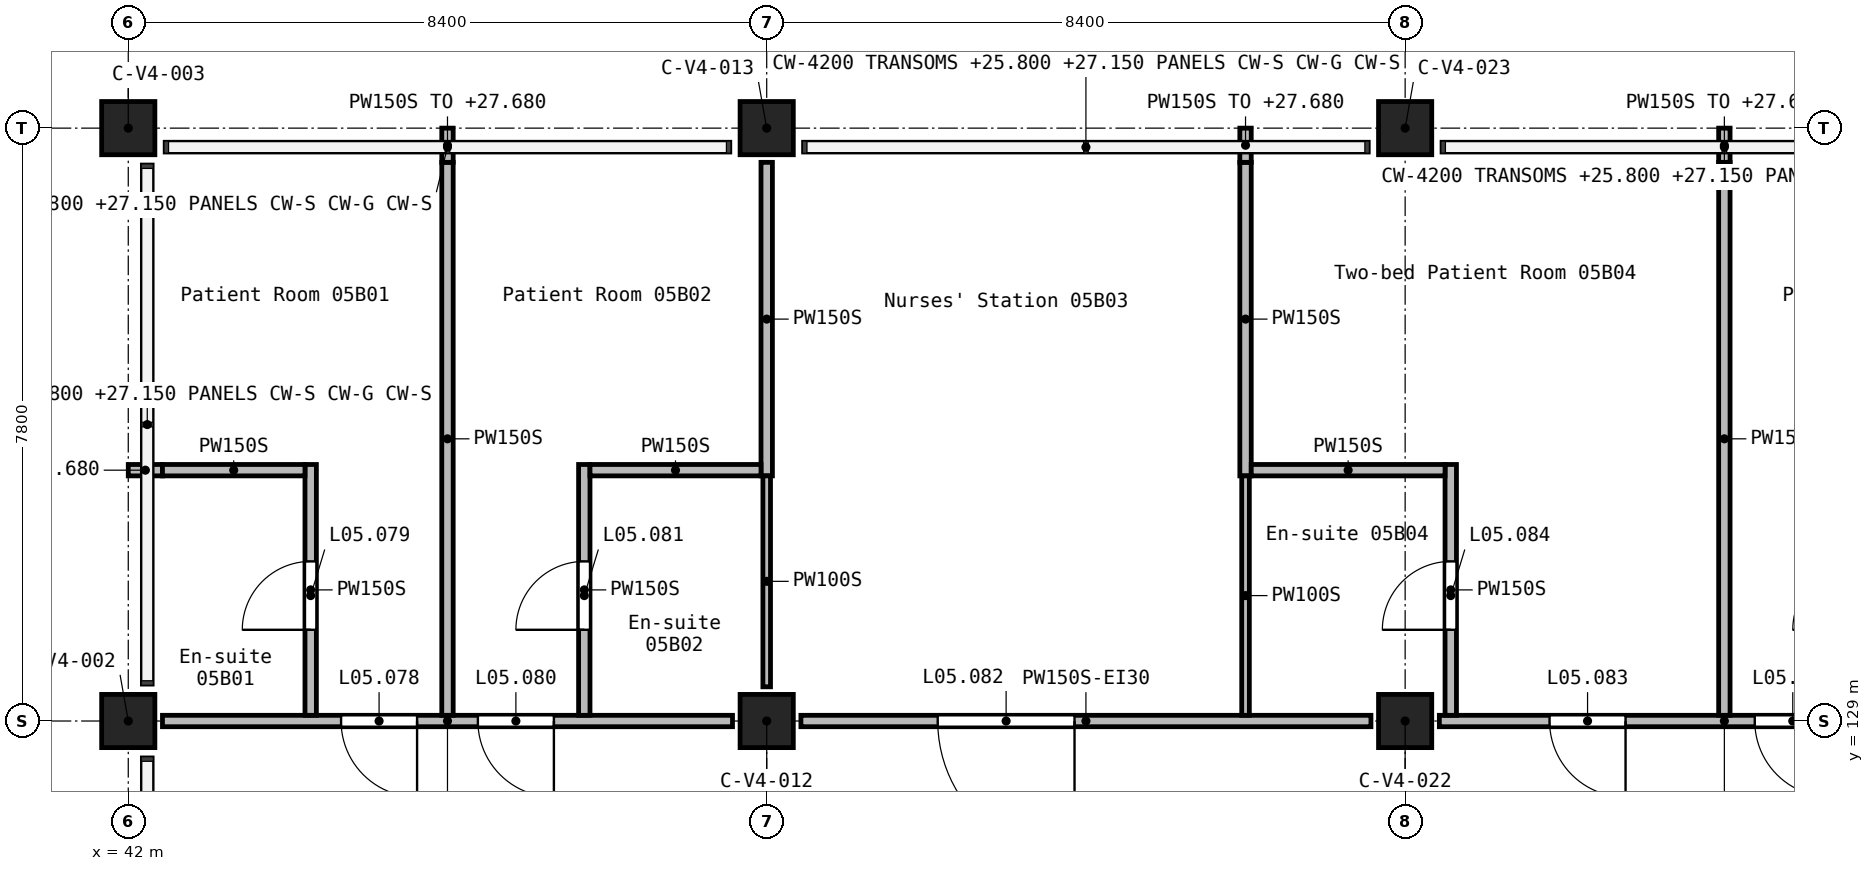
"""IFC4 building model, lengths in metres.
Left out: names, types, materials, properties, quantities, classifications, styles, units other than length and angle.
Written with IfcOpenShell. Run it as: python <this file> out.ifc"""

import sys

from ifc_helpers import new_model, si_unit, direction, frame, frame_2d, origin, origin_2d, place, context, subcontext, project, spatial, rectangle, extrude, element, fill, save


model = new_model("IFC4")
c1 = context("Model", 3, precision=1e-05, world=origin(), true_north=direction((0.0, 1.0)))
c2 = subcontext(c1, "Body", "Model", "MODEL_VIEW")
j1 = project(units=[si_unit("LENGTHUNIT", "METRE"), si_unit("PLANEANGLEUNIT", "RADIAN")], contexts=[c1])
p1 = place(None, origin())
s1 = spatial("IfcSite", under=j1, at=p1, CompositionType="ELEMENT")
p2 = place(p1, origin())
s2 = spatial("IfcBuilding", under=s1, at=p2, CompositionType="ELEMENT")
p3 = place(p2, frame((0.0, 0.0, 24.9)))
s3 = spatial("IfcBuildingStorey", under=s2, at=p3, CompositionType="ELEMENT", Elevation=24.9)
for number, where, z_axis, x_axis in (
    (1, (42.0, 129.0, 0.0), (0.0, 0.0, 1.0), (1.0, 0.0, 0.0)),
    (2, (42.0, 136.8, 0.0), (0.0, 0.0, 1.0), (1.0, 0.0, 0.0)),
    (3, (50.4, 129.0, 0.0), (0.0, 0.0, 1.0), (1.0, 0.0, 0.0)),
    (4, (50.4, 136.8, 0.0), (0.0, 0.0, 1.0), (1.0, 0.0, 0.0)),
    (5, (58.8, 129.0, 0.0), (0.0, 0.0, 1.0), (1.0, 0.0, 0.0)),
    (6, (58.8, 136.8, 0.0), (0.0, 0.0, 1.0), (1.0, 0.0, 0.0)),
):
    element("IfcColumn", number, at=place(p3, frame(where, z_axis=z_axis, x_axis=x_axis)), inside=s3, PredefinedType="COLUMN", context=c2, shape_type="SweptSolid", body=[
        extrude(rectangle(XDim=0.7, YDim=0.7, at=origin_2d()), origin(), (0.0, 0.0, 1.0), 3.9),
    ])
p4 = place(p3, frame((66.75, 129.0, 0.0), z_axis=(0.0, 0.0, 1.0), x_axis=(-1.0, 0.0, 0.0)))
e7 = element("IfcWall", 7, at=p4, inside=s3, PredefinedType="PARTITIONING", context=c2, shape_type="SweptSolid", body=[
    extrude(rectangle(XDim=7.5, YDim=0.15, at=frame_2d((3.75, 0.0))), origin(), (0.0, 0.0, 1.0), 3.6),
])
p5 = place(p4, frame((5.05, 0.0, 0.0)))
e8 = element("IfcOpeningElement", 8, at=p5, cuts=e7, PredefinedType="OPENING", context=c2, shape_type="SweptSolid", body=[
    extrude(rectangle(XDim=1.0, YDim=2.1, at=frame_2d((0.5, 1.05))), frame((0.0, 0.085, 0.0), z_axis=(0.0, -1.0, 0.0), x_axis=(1.0, 0.0, 0.0)), (0.0, 0.0, 1.0), 0.17),
])
p6 = place(p4, frame((2.35, 0.0, 0.0)))
e9 = element("IfcOpeningElement", 9, at=p6, cuts=e7, PredefinedType="OPENING", context=c2, shape_type="SweptSolid", body=[
    extrude(rectangle(XDim=1.0, YDim=2.1, at=frame_2d((0.5, 1.05))), frame((0.0, 0.085, 0.0), z_axis=(0.0, -1.0, 0.0), x_axis=(1.0, 0.0, 0.0)), (0.0, 0.0, 1.0), 0.17),
])
p7 = place(p3, frame((58.35, 129.0, 0.0), z_axis=(0.0, 0.0, 1.0), x_axis=(-1.0, 0.0, 0.0)))
e10 = element("IfcWall", 10, at=p7, inside=s3, PredefinedType="PARTITIONING", context=c2, shape_type="SweptSolid", body=[
    extrude(rectangle(XDim=7.5, YDim=0.15, at=frame_2d((3.75, 0.0))), origin(), (0.0, 0.0, 1.0), 3.6),
])
p8 = place(p7, frame((3.9, 0.0, 0.0)))
e11 = element("IfcOpeningElement", 11, at=p8, cuts=e10, PredefinedType="OPENING", context=c2, shape_type="SweptSolid", body=[
    extrude(rectangle(XDim=1.8, YDim=2.1, at=frame_2d((0.9, 1.05))), frame((0.0, 0.085, 0.0), z_axis=(0.0, -1.0, 0.0), x_axis=(1.0, 0.0, 0.0)), (0.0, 0.0, 1.0), 0.17),
])
p9 = place(p3, frame((49.95, 129.0, 0.0), z_axis=(0.0, 0.0, 1.0), x_axis=(-1.0, 0.0, 0.0)))
e12 = element("IfcWall", 12, at=p9, inside=s3, PredefinedType="PARTITIONING", context=c2, shape_type="SweptSolid", body=[
    extrude(rectangle(XDim=7.5, YDim=0.15, at=frame_2d((3.75, 0.0))), origin(), (0.0, 0.0, 1.0), 3.6),
])
p10 = place(p9, frame((4.15, 0.0, 0.0)))
e13 = element("IfcOpeningElement", 13, at=p10, cuts=e12, PredefinedType="OPENING", context=c2, shape_type="SweptSolid", body=[
    extrude(rectangle(XDim=1.0, YDim=2.1, at=frame_2d((0.5, 1.05))), frame((0.0, 0.085, 0.0), z_axis=(0.0, -1.0, 0.0), x_axis=(1.0, 0.0, 0.0)), (0.0, 0.0, 1.0), 0.17),
])
p11 = place(p9, frame((2.35, 0.0, 0.0)))
e14 = element("IfcOpeningElement", 14, at=p11, cuts=e12, PredefinedType="OPENING", context=c2, shape_type="SweptSolid", body=[
    extrude(rectangle(XDim=1.0, YDim=2.1, at=frame_2d((0.5, 1.05))), frame((0.0, 0.085, 0.0), z_axis=(0.0, -1.0, 0.0), x_axis=(1.0, 0.0, 0.0)), (0.0, 0.0, 1.0), 0.17),
])
p12 = place(p3, frame((46.2, 129.075, 0.0), z_axis=(0.0, 0.0, 1.0), x_axis=(0.0, 1.0, 0.0)))
e15 = element("IfcWall", 15, at=p12, inside=s3, PredefinedType="PARTITIONING", context=c2, shape_type="SweptSolid", body=[
    extrude(rectangle(XDim=7.275, YDim=0.15, at=frame_2d((3.638, 0.0))), origin(), (0.0, 0.0, 1.0), 3.6),
])
p13 = place(p3, frame((46.2, 136.35, 0.0), z_axis=(0.0, 0.0, 1.0), x_axis=(0.0, 1.0, 0.0)))
e16 = element("IfcWall", 16, at=p13, inside=s3, PredefinedType="PARTITIONING", context=c2, shape_type="SweptSolid", body=[
    extrude(rectangle(XDim=0.45, YDim=0.15, at=frame_2d((0.225, 0.0))), origin(), (0.0, 0.0, 1.0), 2.78),
])
p14 = place(p3, frame((63.0, 129.075, 0.0), z_axis=(0.0, 0.0, 1.0), x_axis=(0.0, 1.0, 0.0)))
e17 = element("IfcWall", 17, at=p14, inside=s3, PredefinedType="PARTITIONING", context=c2, shape_type="SweptSolid", body=[
    extrude(rectangle(XDim=7.275, YDim=0.15, at=frame_2d((3.638, 0.0))), origin(), (0.0, 0.0, 1.0), 3.6),
])
p15 = place(p3, frame((63.0, 136.35, 0.0), z_axis=(0.0, 0.0, 1.0), x_axis=(0.0, 1.0, 0.0)))
e18 = element("IfcWall", 18, at=p15, inside=s3, PredefinedType="PARTITIONING", context=c2, shape_type="SweptSolid", body=[
    extrude(rectangle(XDim=0.45, YDim=0.15, at=frame_2d((0.225, 0.0))), origin(), (0.0, 0.0, 1.0), 2.78),
])
for number, where, z_axis, x_axis in (
    (19, (50.4, 132.225, 0.0), (0.0, 0.0, 1.0), (0.0, 1.0, 0.0)),
    (20, (56.7, 132.225, 0.0), (0.0, 0.0, 1.0), (0.0, 1.0, 0.0)),
):
    element("IfcWall", number, at=place(p3, frame(where, z_axis=z_axis, x_axis=x_axis)), inside=s3, PredefinedType="PARTITIONING", context=c2, shape_type="SweptSolid", body=[
        extrude(rectangle(XDim=4.125, YDim=0.15, at=frame_2d((2.062, 0.0))), origin(), (0.0, 0.0, 1.0), 3.6),
    ])
p16 = place(p3, frame((56.7, 136.35, 0.0), z_axis=(0.0, 0.0, 1.0), x_axis=(0.0, 1.0, 0.0)))
e21 = element("IfcWall", 21, at=p16, inside=s3, PredefinedType="PARTITIONING", context=c2, shape_type="SweptSolid", body=[
    extrude(rectangle(XDim=0.45, YDim=0.15, at=frame_2d((0.225, 0.0))), origin(), (0.0, 0.0, 1.0), 2.78),
])
p17 = place(p3, frame((44.4, 129.075, 0.0), z_axis=(0.0, 0.0, 1.0), x_axis=(0.0, 1.0, 0.0)))
e22 = element("IfcWall", 22, at=p17, inside=s3, PredefinedType="PARTITIONING", context=c2, shape_type="SweptSolid", body=[
    extrude(rectangle(XDim=3.3, YDim=0.15, at=frame_2d((1.65, 0.0))), origin(), (0.0, 0.0, 1.0), 3.6),
])
p18 = place(p17, frame((1.125, 0.0, 0.0)))
e23 = element("IfcOpeningElement", 23, at=p18, cuts=e22, PredefinedType="OPENING", context=c2, shape_type="SweptSolid", body=[
    extrude(rectangle(XDim=0.9, YDim=2.1, at=frame_2d((0.45, 1.05))), frame((0.0, 0.085, 0.0), z_axis=(0.0, -1.0, 0.0), x_axis=(1.0, 0.0, 0.0)), (0.0, 0.0, 1.0), 0.17),
])
p19 = place(p3, frame((48.0, 129.075, 0.0), z_axis=(0.0, 0.0, 1.0), x_axis=(0.0, 1.0, 0.0)))
e24 = element("IfcWall", 24, at=p19, inside=s3, PredefinedType="PARTITIONING", context=c2, shape_type="SweptSolid", body=[
    extrude(rectangle(XDim=3.3, YDim=0.15, at=frame_2d((1.65, 0.0))), origin(), (0.0, 0.0, 1.0), 3.6),
])
p20 = place(p19, frame((1.125, 0.0, 0.0)))
e25 = element("IfcOpeningElement", 25, at=p20, cuts=e24, PredefinedType="OPENING", context=c2, shape_type="SweptSolid", body=[
    extrude(rectangle(XDim=0.9, YDim=2.1, at=frame_2d((0.45, 1.05))), frame((0.0, 0.085, 0.0), z_axis=(0.0, -1.0, 0.0), x_axis=(1.0, 0.0, 0.0)), (0.0, 0.0, 1.0), 0.17),
])
p21 = place(p3, frame((59.4, 129.075, 0.0), z_axis=(0.0, 0.0, 1.0), x_axis=(0.0, 1.0, 0.0)))
e26 = element("IfcWall", 26, at=p21, inside=s3, PredefinedType="PARTITIONING", context=c2, shape_type="SweptSolid", body=[
    extrude(rectangle(XDim=3.3, YDim=0.15, at=frame_2d((1.65, 0.0))), origin(), (0.0, 0.0, 1.0), 3.6),
])
p22 = place(p21, frame((1.125, 0.0, 0.0)))
e27 = element("IfcOpeningElement", 27, at=p22, cuts=e26, PredefinedType="OPENING", context=c2, shape_type="SweptSolid", body=[
    extrude(rectangle(XDim=0.9, YDim=2.1, at=frame_2d((0.45, 1.05))), frame((0.0, 0.085, 0.0), z_axis=(0.0, -1.0, 0.0), x_axis=(1.0, 0.0, 0.0)), (0.0, 0.0, 1.0), 0.17),
])
p23 = place(p3, frame((56.775, 132.3, 0.0), z_axis=(0.0, 0.0, 1.0), x_axis=(1.0, 0.0, 0.0)))
e28 = element("IfcWall", 28, at=p23, inside=s3, PredefinedType="PARTITIONING", context=c2, shape_type="SweptSolid", body=[
    extrude(rectangle(XDim=2.55, YDim=0.15, at=frame_2d((1.275, 0.0))), origin(), (0.0, 0.0, 1.0), 3.6),
])
p24 = place(p3, frame((42.0, 132.3, 0.0), z_axis=(0.0, 0.0, 1.0), x_axis=(1.0, 0.0, 0.0)))
e29 = element("IfcWall", 29, at=p24, inside=s3, PredefinedType="PARTITIONING", context=c2, shape_type="SweptSolid", body=[
    extrude(rectangle(XDim=0.45, YDim=0.15, at=frame_2d((0.225, 0.0))), origin(), (0.0, 0.0, 1.0), 2.78),
])
p25 = place(p3, frame((42.45, 132.3, 0.0), z_axis=(0.0, 0.0, 1.0), x_axis=(1.0, 0.0, 0.0)))
e30 = element("IfcWall", 30, at=p25, inside=s3, PredefinedType="PARTITIONING", context=c2, shape_type="SweptSolid", body=[
    extrude(rectangle(XDim=1.875, YDim=0.15, at=frame_2d((0.938, 0.0))), origin(), (0.0, 0.0, 1.0), 3.6),
])
p26 = place(p3, frame((48.075, 132.3, 0.0), z_axis=(0.0, 0.0, 1.0), x_axis=(1.0, 0.0, 0.0)))
e31 = element("IfcWall", 31, at=p26, inside=s3, PredefinedType="PARTITIONING", context=c2, shape_type="SweptSolid", body=[
    extrude(rectangle(XDim=2.25, YDim=0.15, at=frame_2d((1.125, 0.0))), origin(), (0.0, 0.0, 1.0), 3.6),
])
p27 = place(p3, frame((50.4, 129.45, 0.0), z_axis=(0.0, 0.0, 1.0), x_axis=(0.0, 1.0, 0.0)))
e32 = element("IfcWall", 32, at=p27, inside=s3, PredefinedType="PARTITIONING", context=c2, shape_type="SweptSolid", body=[
    extrude(rectangle(XDim=2.775, YDim=0.1, at=frame_2d((1.388, 0.0))), origin(), (0.0, 0.0, 1.0), 3.6),
])
p28 = place(p3, frame((56.7, 129.075, 0.0), z_axis=(0.0, 0.0, 1.0), x_axis=(0.0, 1.0, 0.0)))
e33 = element("IfcWall", 33, at=p28, inside=s3, PredefinedType="PARTITIONING", context=c2, shape_type="SweptSolid", body=[
    extrude(rectangle(XDim=3.15, YDim=0.1, at=frame_2d((1.575, 0.0))), origin(), (0.0, 0.0, 1.0), 3.6),
])
p29 = place(p10, frame((1.0, 0.0, 0.0), z_axis=(0.0, 0.0, 1.0), x_axis=(-1.0, 0.0, 0.0)))
e34 = element("IfcDoor", 34, at=p29, inside=s3, OperationType="SINGLE_SWING_LEFT", PredefinedType="DOOR", context=c2, shape_type="SweptSolid", body=[
    extrude(rectangle(XDim=1.0, YDim=2.1, at=frame_2d((0.5, 1.05))), frame((0.0, 0.025, 0.0), z_axis=(0.0, -1.0, 0.0), x_axis=(1.0, 0.0, 0.0)), (0.0, 0.0, 1.0), 0.05),
])
fill(e13, e34)
p30 = place(p18, origin())
e35 = element("IfcDoor", 35, at=p30, inside=s3, OperationType="SINGLE_SWING_LEFT", PredefinedType="DOOR", context=c2, shape_type="SweptSolid", body=[
    extrude(rectangle(XDim=0.9, YDim=2.1, at=frame_2d((0.45, 1.05))), frame((0.0, 0.025, 0.0), z_axis=(0.0, -1.0, 0.0), x_axis=(1.0, 0.0, 0.0)), (0.0, 0.0, 1.0), 0.05),
])
fill(e23, e35)
p31 = place(p11, frame((1.0, 0.0, 0.0), z_axis=(0.0, 0.0, 1.0), x_axis=(-1.0, 0.0, 0.0)))
e36 = element("IfcDoor", 36, at=p31, inside=s3, OperationType="SINGLE_SWING_RIGHT", PredefinedType="DOOR", context=c2, shape_type="SweptSolid", body=[
    extrude(rectangle(XDim=1.0, YDim=2.1, at=frame_2d((0.5, 1.05))), frame((0.0, 0.025, 0.0), z_axis=(0.0, -1.0, 0.0), x_axis=(1.0, 0.0, 0.0)), (0.0, 0.0, 1.0), 0.05),
])
fill(e14, e36)
p32 = place(p20, frame((0.9, 0.0, 0.0), z_axis=(0.0, 0.0, 1.0), x_axis=(-1.0, 0.0, 0.0)))
e37 = element("IfcDoor", 37, at=p32, inside=s3, OperationType="SINGLE_SWING_RIGHT", PredefinedType="DOOR", context=c2, shape_type="SweptSolid", body=[
    extrude(rectangle(XDim=0.9, YDim=2.1, at=frame_2d((0.45, 1.05))), frame((0.0, 0.025, 0.0), z_axis=(0.0, -1.0, 0.0), x_axis=(1.0, 0.0, 0.0)), (0.0, 0.0, 1.0), 0.05),
])
fill(e25, e37)
p33 = place(p8, frame((1.8, 0.0, 0.0), z_axis=(0.0, 0.0, 1.0), x_axis=(-1.0, 0.0, 0.0)))
e38 = element("IfcDoor", 38, at=p33, inside=s3, OperationType="DOUBLE_DOOR_SINGLE_SWING", PredefinedType="DOOR", context=c2, shape_type="SweptSolid", body=[
    extrude(rectangle(XDim=1.8, YDim=2.1, at=frame_2d((0.9, 1.05))), frame((0.0, 0.025, 0.0), z_axis=(0.0, -1.0, 0.0), x_axis=(1.0, 0.0, 0.0)), (0.0, 0.0, 1.0), 0.05),
])
fill(e11, e38)
p34 = place(p5, frame((1.0, 0.0, 0.0), z_axis=(0.0, 0.0, 1.0), x_axis=(-1.0, 0.0, 0.0)))
e39 = element("IfcDoor", 39, at=p34, inside=s3, OperationType="SINGLE_SWING_LEFT", PredefinedType="DOOR", context=c2, shape_type="SweptSolid", body=[
    extrude(rectangle(XDim=1.0, YDim=2.1, at=frame_2d((0.5, 1.05))), frame((0.0, 0.025, 0.0), z_axis=(0.0, -1.0, 0.0), x_axis=(1.0, 0.0, 0.0)), (0.0, 0.0, 1.0), 0.05),
])
fill(e8, e39)
p35 = place(p22, origin())
e40 = element("IfcDoor", 40, at=p35, inside=s3, OperationType="SINGLE_SWING_LEFT", PredefinedType="DOOR", context=c2, shape_type="SweptSolid", body=[
    extrude(rectangle(XDim=0.9, YDim=2.1, at=frame_2d((0.45, 1.05))), frame((0.0, 0.025, 0.0), z_axis=(0.0, -1.0, 0.0), x_axis=(1.0, 0.0, 0.0)), (0.0, 0.0, 1.0), 0.05),
])
fill(e27, e40)
p36 = place(p6, frame((1.0, 0.0, 0.0), z_axis=(0.0, 0.0, 1.0), x_axis=(-1.0, 0.0, 0.0)))
e41 = element("IfcDoor", 41, at=p36, inside=s3, OperationType="SINGLE_SWING_RIGHT", PredefinedType="DOOR", context=c2, shape_type="SweptSolid", body=[
    extrude(rectangle(XDim=1.0, YDim=2.1, at=frame_2d((0.5, 1.05))), frame((0.0, 0.025, 0.0), z_axis=(0.0, -1.0, 0.0), x_axis=(1.0, 0.0, 0.0)), (0.0, 0.0, 1.0), 0.05),
])
fill(e9, e41)
save(model, sys.argv[1])
